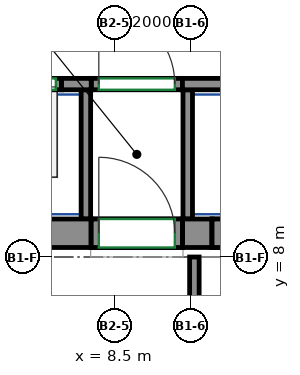
"""IFC4 building model, lengths in metres.
Left out: names, types, materials, properties, quantities, classifications, styles, units other than length and angle.
Written with IfcOpenShell. Run it as: python <this file> out.ifc"""

import sys

from ifc_helpers import new_model, si_unit, direction, frame, frame_2d, origin, place, context, subcontext, project, spatial, rectangle, extrude, source, transform, mapped, element, fill, save


model = new_model("IFC4")
c1 = context("Model", 3, precision=1e-05, world=origin(), true_north=direction((0.0, 1.0)))
c2 = subcontext(c1, "Body", "Model", "MODEL_VIEW")
j1 = project(units=[si_unit("LENGTHUNIT", "METRE"), si_unit("PLANEANGLEUNIT", "RADIAN")], contexts=[c1])
p1 = place(None, origin())
s1 = spatial("IfcSite", under=j1, at=p1, CompositionType="ELEMENT")
p2 = place(p1, origin())
s2 = spatial("IfcBuilding", under=s1, at=p2, CompositionType="ELEMENT")
p3 = place(p2, frame((0.0, 0.0, 233.6)))
s3 = spatial("IfcBuildingStorey", under=s2, at=p3, CompositionType="ELEMENT", Elevation=233.6)
m1 = source(origin(), c2, "Body", "SweptSolid", [
    extrude(rectangle(XDim=14.18, YDim=0.75, at=frame_2d((7.09, 0.0))), origin(), (0.0, 0.0, 1.0), 5.12),
])
p4 = place(p3, frame((-6.29, 8.625, 0.0), z_axis=(0.0, 0.0, 1.0), x_axis=(1.0, 0.0, 0.0)))
e1 = element("IfcWall", 1, at=p4, inside=s3, PredefinedType="SHEAR", context=c2, shape_type="MappedRepresentation", body=[
    mapped(m1, transform((0.0, 0.0, 0.0))),
])
m2 = source(origin(), c2, "Body", "SweptSolid", [
    extrude(rectangle(XDim=0.78, YDim=0.75, at=frame_2d((0.39, 0.0))), origin(), (0.0, 0.0, 1.0), 5.12),
])
p5 = place(p3, frame((10.29, 8.625, 0.0), z_axis=(0.0, 0.0, 1.0), x_axis=(1.0, 0.0, 0.0)))
e2 = element("IfcWall", 2, at=p5, inside=s3, PredefinedType="SHEAR", context=c2, shape_type="MappedRepresentation", body=[
    mapped(m2, transform((0.0, 0.0, 0.0))),
])
m3 = source(origin(), c2, "Body", "SweptSolid", [
    extrude(rectangle(XDim=0.78, YDim=0.3, at=frame_2d((0.39, 0.0))), origin(), (0.0, 0.0, 1.0), 5.12),
])
p6 = place(p3, frame((7.11, 12.55, 0.0), z_axis=(0.0, 0.0, 1.0), x_axis=(1.0, 0.0, 0.0)))
e3 = element("IfcWall", 3, at=p6, inside=s3, PredefinedType="SHEAR", context=c2, shape_type="MappedRepresentation", body=[
    mapped(m3, transform((0.0, 0.0, 0.0))),
])
m4 = source(origin(), c2, "Body", "SweptSolid", [
    extrude(rectangle(XDim=2.82, YDim=0.3, at=frame_2d((1.41, 0.0))), origin(), (0.0, 0.0, 1.0), 5.12),
])
p7 = place(p3, frame((10.29, 12.55, 0.0), z_axis=(0.0, 0.0, 1.0), x_axis=(1.0, 0.0, 0.0)))
e4 = element("IfcWall", 4, at=p7, inside=s3, PredefinedType="SHEAR", context=c2, shape_type="MappedRepresentation", body=[
    mapped(m4, transform((0.0, 0.0, 0.0))),
])
m5 = source(origin(), c2, "Body", "SweptSolid", [
    extrude(rectangle(XDim=2.4, YDim=0.75, at=frame_2d((1.2, 0.0))), origin(), (0.0, 0.0, 1.0), 0.92),
])
p8 = place(p3, frame((7.89, 8.625, 4.2), z_axis=(0.0, 0.0, 1.0), x_axis=(1.0, 0.0, 0.0)))
e5 = element("IfcWall", 5, at=p8, inside=s3, PredefinedType="SHEAR", context=c2, shape_type="MappedRepresentation", body=[
    mapped(m5, transform((0.0, 0.0, 0.0))),
])
m6 = source(origin(), c2, "Body", "SweptSolid", [
    extrude(rectangle(XDim=1.4, YDim=0.75, at=frame_2d((0.7, 0.0))), origin(), (0.0, 0.0, 1.0), 1.17),
])
p9 = place(p3, frame((11.07, 8.625, 3.95), z_axis=(0.0, 0.0, 1.0), x_axis=(1.0, 0.0, 0.0)))
e6 = element("IfcWall", 6, at=p9, inside=s3, PredefinedType="SHEAR", context=c2, shape_type="MappedRepresentation", body=[
    mapped(m6, transform((0.0, 0.0, 0.0))),
])
m7 = source(origin(), c2, "Body", "SweptSolid", [
    extrude(rectangle(XDim=1.4, YDim=0.3, at=frame_2d((0.7, 0.0))), origin(), (0.0, 0.0, 1.0), 5.12),
])
p10 = place(p3, frame((5.71, 12.55, 0.0), z_axis=(0.0, 0.0, 1.0), x_axis=(1.0, 0.0, 0.0)))
e7 = element("IfcWall", 7, at=p10, inside=s3, PredefinedType="PARTITIONING", context=c2, shape_type="MappedRepresentation", body=[
    mapped(m7, transform((0.0, 0.0, 0.0))),
])
p11 = place(p10, frame((0.15, 0.0, 0.0)))
e8 = element("IfcOpeningElement", 8, at=p11, cuts=e7, PredefinedType="OPENING", context=c2, shape_type="SweptSolid", body=[
    extrude(rectangle(XDim=1.1, YDim=2.1, at=frame_2d((0.55, 1.05))), frame((0.0, 0.16, 0.0), z_axis=(0.0, -1.0, 0.0), x_axis=(1.0, 0.0, 0.0)), (0.0, 0.0, 1.0), 0.32),
])
m8 = source(origin(), c2, "Body", "SweptSolid", [
    extrude(rectangle(XDim=2.4, YDim=0.3, at=frame_2d((1.2, 0.0))), origin(), (0.0, 0.0, 1.0), 5.12),
])
p12 = place(p3, frame((7.89, 12.55, 0.0), z_axis=(0.0, 0.0, 1.0), x_axis=(1.0, 0.0, 0.0)))
e9 = element("IfcWall", 9, at=p12, inside=s3, PredefinedType="PARTITIONING", context=c2, shape_type="MappedRepresentation", body=[
    mapped(m8, transform((0.0, 0.0, 0.0))),
])
p13 = place(p12, frame((0.2, 0.0, 0.0)))
e10 = element("IfcOpeningElement", 10, at=p13, cuts=e9, PredefinedType="OPENING", context=c2, shape_type="SweptSolid", body=[
    extrude(rectangle(XDim=2.0, YDim=2.1, at=frame_2d((1.0, 1.05))), frame((0.0, 0.16, 0.0), z_axis=(0.0, -1.0, 0.0), x_axis=(1.0, 0.0, 0.0)), (0.0, 0.0, 1.0), 0.32),
])
m9 = source(origin(), c2, "Body", "SweptSolid", [
    extrude(rectangle(XDim=2.65, YDim=0.25, at=frame_2d((1.325, 0.0))), origin(), (0.0, 0.0, 1.0), 4.57),
])
p14 = place(p3, frame((10.605, 5.35, 0.0), z_axis=(0.0, 0.0, 1.0), x_axis=(0.0, 1.0, 0.0)))
e11 = element("IfcWall", 11, at=p14, inside=s3, PredefinedType="PARTITIONING", context=c2, shape_type="MappedRepresentation", body=[
    mapped(m9, transform((0.0, 0.0, 0.0))),
])
m10 = source(origin(), c2, "Body", "SweptSolid", [
    extrude(rectangle(XDim=3.4, YDim=0.25, at=frame_2d((1.7, 0.0))), origin(), (0.0, 0.0, 1.0), 5.12),
])
for number, where, z_axis, x_axis in (
    (12, (10.43, 9.0, 0.0), (0.0, 0.0, 1.0), (0.0, 1.0, 0.0)),
    (13, (7.75, 9.0, 0.0), (0.0, 0.0, 1.0), (0.0, 1.0, 0.0)),
):
    element("IfcWall", number, at=place(p3, frame(where, z_axis=z_axis, x_axis=x_axis)), inside=s3, PredefinedType="PARTITIONING", context=c2, shape_type="MappedRepresentation", body=[
        mapped(m10, transform((0.0, 0.0, 0.0))),
    ])
m11 = source(origin(), c2, "Body", "SweptSolid", [
    extrude(rectangle(XDim=2.4, YDim=0.75, at=frame_2d((1.2, 0.0))), origin(), (0.0, 0.0, 1.0), 2.7),
])
p15 = place(p3, frame((7.89, 8.625, 0.0), z_axis=(0.0, 0.0, 1.0), x_axis=(1.0, 0.0, 0.0)))
e14 = element("IfcWall", 14, at=p15, inside=s3, PredefinedType="PARTITIONING", context=c2, shape_type="MappedRepresentation", body=[
    mapped(m11, transform((0.0, 0.0, 0.0))),
])
p16 = place(p15, frame((0.2, 0.0, 0.0)))
e15 = element("IfcOpeningElement", 15, at=p16, cuts=e14, PredefinedType="OPENING", context=c2, shape_type="SweptSolid", body=[
    extrude(rectangle(XDim=2.0, YDim=2.1, at=frame_2d((1.0, 1.05))), frame((0.0, 0.385, 0.0), z_axis=(0.0, -1.0, 0.0), x_axis=(1.0, 0.0, 0.0)), (0.0, 0.0, 1.0), 0.77),
])
m12 = source(origin(), c2, "Body", "SweptSolid", [
    extrude(rectangle(XDim=1.4, YDim=0.75, at=frame_2d((0.7, 0.0))), origin(), (0.0, 0.0, 1.0), 2.7),
])
p17 = place(p3, frame((11.07, 8.625, 0.0), z_axis=(0.0, 0.0, 1.0), x_axis=(1.0, 0.0, 0.0)))
e16 = element("IfcWall", 16, at=p17, inside=s3, PredefinedType="PARTITIONING", context=c2, shape_type="MappedRepresentation", body=[
    mapped(m12, transform((0.0, 0.0, 0.0))),
])
p18 = place(p17, frame((0.25, 0.0, 0.0)))
e17 = element("IfcOpeningElement", 17, at=p18, cuts=e16, PredefinedType="OPENING", context=c2, shape_type="SweptSolid", body=[
    extrude(rectangle(XDim=0.9, YDim=2.1, at=frame_2d((0.45, 1.05))), frame((0.0, 0.385, 0.0), z_axis=(0.0, -1.0, 0.0), x_axis=(1.0, 0.0, 0.0)), (0.0, 0.0, 1.0), 0.77),
])
p19 = place(p13, origin())
e18 = element("IfcDoor", 18, at=p19, inside=s3, OperationType="DOUBLE_DOOR_SINGLE_SWING", PredefinedType="DOOR", context=c2, shape_type="SweptSolid", body=[
    extrude(rectangle(XDim=2.0, YDim=2.1, at=frame_2d((1.0, 1.05))), frame((0.0, 0.025, 0.0), z_axis=(0.0, -1.0, 0.0), x_axis=(1.0, 0.0, 0.0)), (0.0, 0.0, 1.0), 0.05),
])
fill(e10, e18)
p20 = place(p16, origin())
e19 = element("IfcDoor", 19, at=p20, inside=s3, OperationType="DOUBLE_DOOR_SINGLE_SWING", PredefinedType="DOOR", context=c2, shape_type="SweptSolid", body=[
    extrude(rectangle(XDim=2.0, YDim=2.1, at=frame_2d((1.0, 1.05))), frame((0.0, 0.28, 0.0), z_axis=(0.0, -1.0, 0.0), x_axis=(1.0, 0.0, 0.0)), (0.0, 0.0, 1.0), 0.05),
])
fill(e15, e19)
p21 = place(p11, origin())
e20 = element("IfcDoor", 20, at=p21, inside=s3, OperationType="DOUBLE_DOOR_SLIDING", PredefinedType="DOOR", context=c2, shape_type="SweptSolid", body=[
    extrude(rectangle(XDim=1.1, YDim=2.1, at=frame_2d((0.55, 1.05))), frame((0.0, 0.025, 0.0), z_axis=(0.0, -1.0, 0.0), x_axis=(1.0, 0.0, 0.0)), (0.0, 0.0, 1.0), 0.05),
])
fill(e8, e20)
save(model, sys.argv[1])
